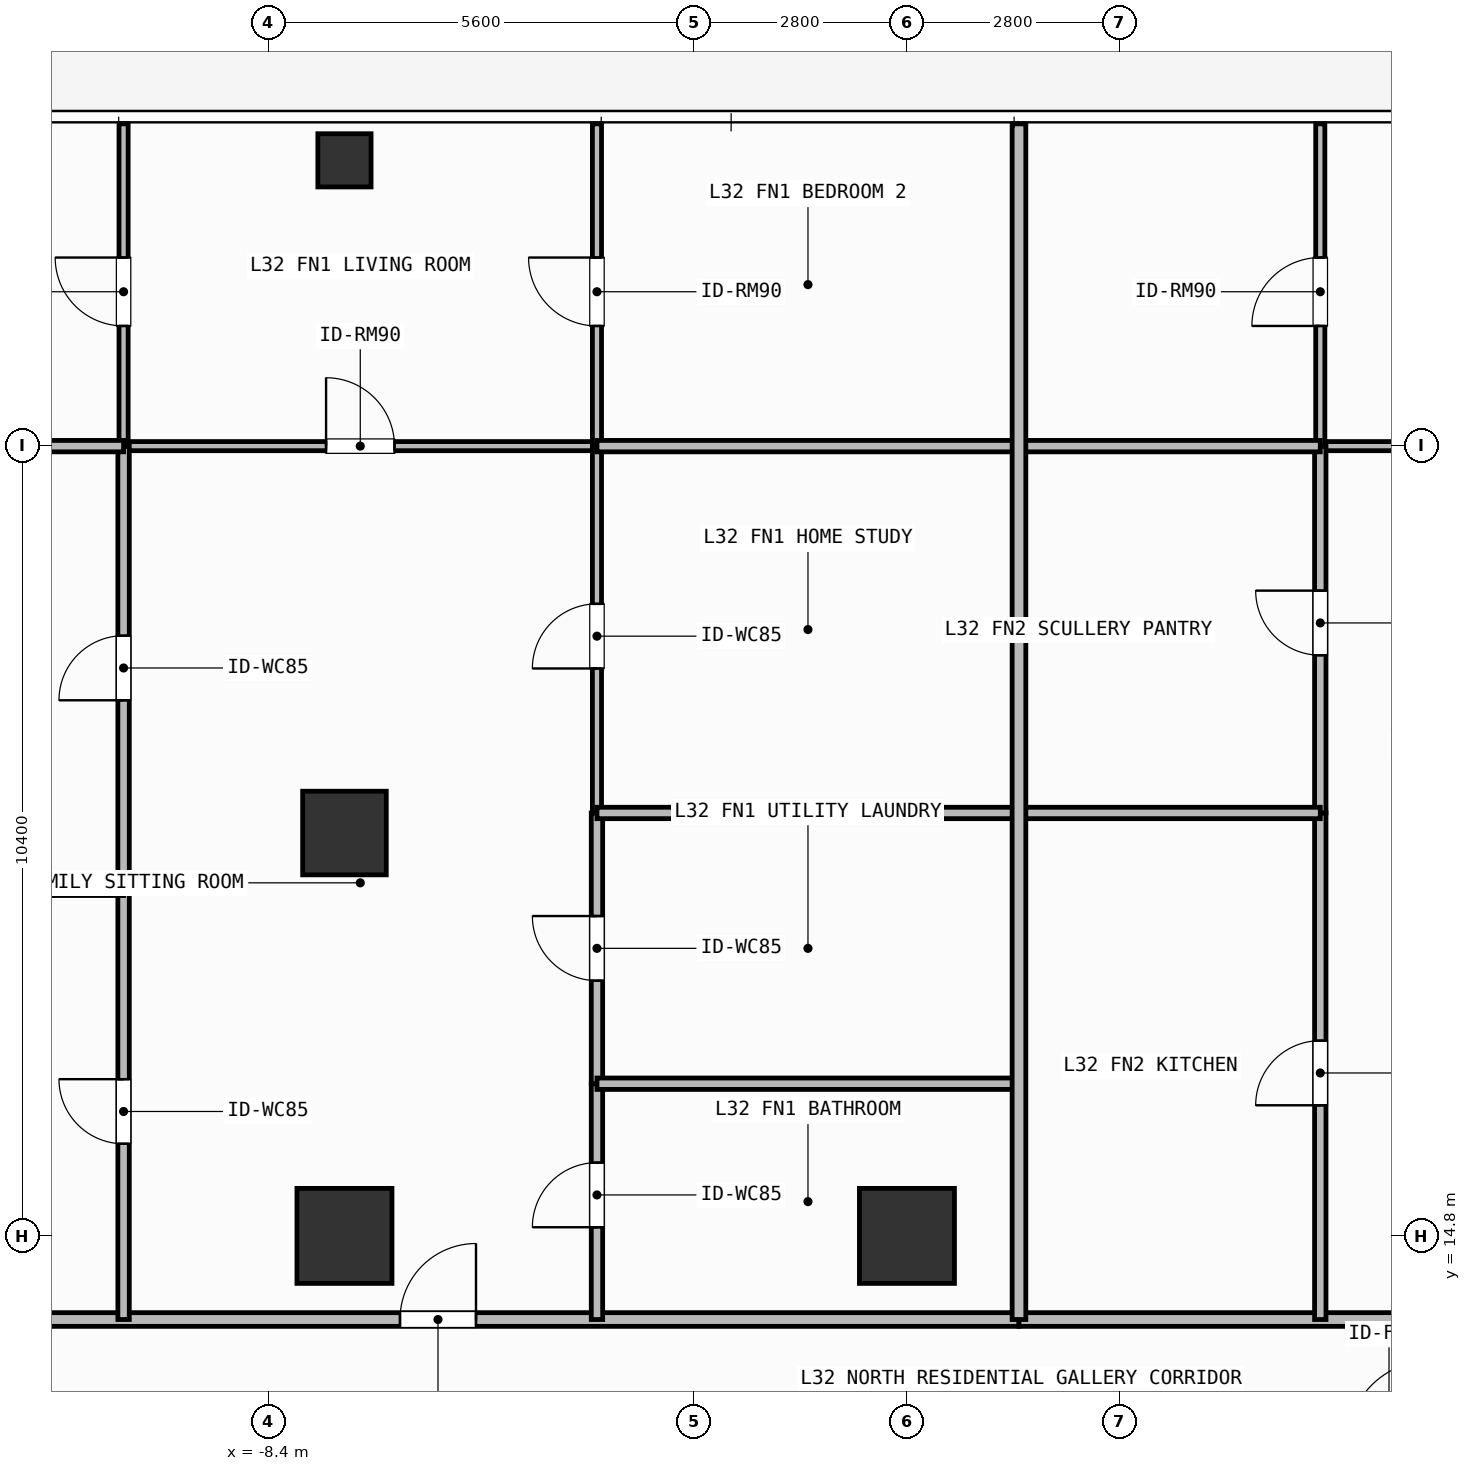
"""IFC4 building model, lengths in metres.
Left out: names, types, materials, properties, quantities, classifications, styles, units other than length and angle.
Written with IfcOpenShell. Run it as: python <this file> out.ifc"""

import sys

from ifc_helpers import new_model, si_unit, direction, frame, frame_2d, origin, origin_2d, place, context, subcontext, project, spatial, rectangle, hollow_rectangle, extrude, element, fill, save


model = new_model("IFC4")
c1 = context("Model", 3, precision=1e-05, world=origin(), true_north=direction((0.0, 1.0)))
c2 = subcontext(c1, "Body", "Model", "MODEL_VIEW")
j1 = project(units=[si_unit("LENGTHUNIT", "METRE"), si_unit("PLANEANGLEUNIT", "RADIAN")], contexts=[c1])
p1 = place(None, origin())
s1 = spatial("IfcSite", under=j1, at=p1, CompositionType="ELEMENT")
p2 = place(p1, origin())
s2 = spatial("IfcBuilding", under=s1, at=p2, CompositionType="ELEMENT")
p3 = place(p2, frame((0.0, 0.0, 129.0)))
s3 = spatial("IfcBuildingStorey", under=s2, at=p3, CompositionType="ELEMENT", Elevation=129.0)
for number, where, z_axis, x_axis in (
    (1, (-7.4, 14.8, 0.0), (0.0, 0.0, 1.0), (1.0, 0.0, 0.0)),
    (2, (0.0, 14.8, 0.0), (0.0, 0.0, 1.0), (1.0, 0.0, 0.0)),
):
    element("IfcColumn", number, at=place(p3, frame(where, z_axis=z_axis, x_axis=x_axis)), inside=s3, PredefinedType="COLUMN", context=c2, shape_type="SweptSolid", body=[
        extrude(rectangle(XDim=1.25, YDim=1.25, at=origin_2d()), origin(), (0.0, 0.0, 1.0), 3.9),
    ])
p4 = place(p3, frame((-7.4, 20.1, 0.0), z_axis=(0.0, 0.0, 1.0), x_axis=(1.0, 0.0, 0.0)))
e3 = element("IfcColumn", 3, at=p4, inside=s3, PredefinedType="COLUMN", context=c2, shape_type="SweptSolid", body=[
    extrude(rectangle(XDim=1.1, YDim=1.1, at=origin_2d()), origin(), (0.0, 0.0, 1.0), 3.9),
])
p5 = place(p3, frame((-7.4, 28.95, 0.0), z_axis=(0.0, 0.0, 1.0), x_axis=(1.0, 0.0, 0.0)))
e4 = element("IfcColumn", 4, at=p5, inside=s3, PredefinedType="COLUMN", context=c2, shape_type="SweptSolid", body=[
    extrude(hollow_rectangle(XDim=0.7, YDim=0.7, WallThickness=0.032, at=origin_2d()), origin(), (0.0, 0.0, 1.0), 3.9),
])
p6 = place(p3, frame((-16.32, 13.7, 0.0), z_axis=(0.0, 0.0, 1.0), x_axis=(1.0, 0.0, 0.0)))
e5 = element("IfcWall", 5, at=p6, inside=s3, PredefinedType="PARTITIONING", context=c2, shape_type="SweptSolid", body=[
    extrude(rectangle(XDim=17.794, YDim=0.18, at=frame_2d((8.897, 0.0))), origin(), (0.0, 0.0, 1.0), 3.68),
])
p7 = place(p6, frame((9.65, 0.0, 0.0)))
e6 = element("IfcOpeningElement", 6, at=p7, cuts=e5, PredefinedType="OPENING", context=c2, shape_type="SweptSolid", body=[
    extrude(rectangle(XDim=1.0, YDim=2.2, at=frame_2d((0.5, 1.1))), frame((0.0, 0.1, 0.0), z_axis=(0.0, -1.0, 0.0), x_axis=(1.0, 0.0, 0.0)), (0.0, 0.0, 1.0), 0.2),
])
p8 = place(p3, frame((-10.306, 25.19, 0.0), z_axis=(0.0, 0.0, 1.0), x_axis=(1.0, 0.0, 0.0)))
e7 = element("IfcWall", 7, at=p8, inside=s3, PredefinedType="PARTITIONING", context=c2, shape_type="SweptSolid", body=[
    extrude(rectangle(XDim=6.228, YDim=0.12, at=frame_2d((3.114, 0.0))), origin(), (0.0, 0.0, 1.0), 3.68),
])
p9 = place(p8, frame((2.664, 0.0, 0.0)))
e8 = element("IfcOpeningElement", 8, at=p9, cuts=e7, PredefinedType="OPENING", context=c2, shape_type="SweptSolid", body=[
    extrude(rectangle(XDim=0.9, YDim=2.1, at=frame_2d((0.45, 1.05))), frame((0.0, 0.07, 0.0), z_axis=(0.0, -1.0, 0.0), x_axis=(1.0, 0.0, 0.0)), (0.0, 0.0, 1.0), 0.14),
])
p10 = place(p3, frame((-10.306, 13.7, 0.0), z_axis=(0.0, 0.0, 1.0), x_axis=(0.0, 1.0, 0.0)))
e9 = element("IfcWall", 9, at=p10, inside=s3, PredefinedType="PARTITIONING", context=c2, shape_type="SweptSolid", body=[
    extrude(rectangle(XDim=5.653, YDim=0.15, at=frame_2d((2.827, 0.0))), origin(), (0.0, 0.0, 1.0), 3.68),
])
p11 = place(p10, frame((2.312, 0.0, 0.0)))
e10 = element("IfcOpeningElement", 10, at=p11, cuts=e9, PredefinedType="OPENING", context=c2, shape_type="SweptSolid", body=[
    extrude(rectangle(XDim=0.85, YDim=2.1, at=frame_2d((0.425, 1.05))), frame((0.0, 0.085, 0.0), z_axis=(0.0, -1.0, 0.0), x_axis=(1.0, 0.0, 0.0)), (0.0, 0.0, 1.0), 0.17),
])
p12 = place(p3, frame((-10.306, 19.353, 0.0), z_axis=(0.0, 0.0, 1.0), x_axis=(0.0, 1.0, 0.0)))
e11 = element("IfcWall", 11, at=p12, inside=s3, PredefinedType="PARTITIONING", context=c2, shape_type="SweptSolid", body=[
    extrude(rectangle(XDim=5.837, YDim=0.15, at=frame_2d((2.918, 0.0))), origin(), (0.0, 0.0, 1.0), 3.68),
])
p13 = place(p12, frame((2.493, 0.0, 0.0)))
e12 = element("IfcOpeningElement", 12, at=p13, cuts=e11, PredefinedType="OPENING", context=c2, shape_type="SweptSolid", body=[
    extrude(rectangle(XDim=0.85, YDim=2.1, at=frame_2d((0.425, 1.05))), frame((0.0, 0.085, 0.0), z_axis=(0.0, -1.0, 0.0), x_axis=(1.0, 0.0, 0.0)), (0.0, 0.0, 1.0), 0.17),
])
p14 = place(p3, frame((-10.306, 25.19, 0.0), z_axis=(0.0, 0.0, 1.0), x_axis=(0.0, 1.0, 0.0)))
e13 = element("IfcWall", 13, at=p14, inside=s3, PredefinedType="PARTITIONING", context=c2, shape_type="SweptSolid", body=[
    extrude(rectangle(XDim=4.24, YDim=0.12, at=frame_2d((2.12, 0.0))), origin(), (0.0, 0.0, 1.0), 3.68),
])
p15 = place(p14, frame((1.581, 0.0, 0.0)))
e14 = element("IfcOpeningElement", 14, at=p15, cuts=e13, PredefinedType="OPENING", context=c2, shape_type="SweptSolid", body=[
    extrude(rectangle(XDim=0.9, YDim=2.1, at=frame_2d((0.45, 1.05))), frame((0.0, 0.07, 0.0), z_axis=(0.0, -1.0, 0.0), x_axis=(1.0, 0.0, 0.0)), (0.0, 0.0, 1.0), 0.14),
])
p16 = place(p3, frame((-4.078, 13.7, 0.0), z_axis=(0.0, 0.0, 1.0), x_axis=(0.0, 1.0, 0.0)))
e15 = element("IfcWall", 15, at=p16, inside=s3, PredefinedType="PARTITIONING", context=c2, shape_type="SweptSolid", body=[
    extrude(rectangle(XDim=3.102, YDim=0.15, at=frame_2d((1.551, 0.0))), origin(), (0.0, 0.0, 1.0), 3.68),
])
p17 = place(p16, frame((1.214, 0.0, 0.0)))
e16 = element("IfcOpeningElement", 16, at=p17, cuts=e15, PredefinedType="OPENING", context=c2, shape_type="SweptSolid", body=[
    extrude(rectangle(XDim=0.85, YDim=2.1, at=frame_2d((0.425, 1.05))), frame((0.0, 0.085, 0.0), z_axis=(0.0, -1.0, 0.0), x_axis=(1.0, 0.0, 0.0)), (0.0, 0.0, 1.0), 0.17),
])
p18 = place(p3, frame((-4.078, 16.802, 0.0), z_axis=(0.0, 0.0, 1.0), x_axis=(0.0, 1.0, 0.0)))
e17 = element("IfcWall", 17, at=p18, inside=s3, PredefinedType="PARTITIONING", context=c2, shape_type="SweptSolid", body=[
    extrude(rectangle(XDim=3.562, YDim=0.15, at=frame_2d((1.781, 0.0))), origin(), (0.0, 0.0, 1.0), 3.68),
])
p19 = place(p18, frame((1.356, 0.0, 0.0)))
e18 = element("IfcOpeningElement", 18, at=p19, cuts=e17, PredefinedType="OPENING", context=c2, shape_type="SweptSolid", body=[
    extrude(rectangle(XDim=0.85, YDim=2.1, at=frame_2d((0.425, 1.05))), frame((0.0, 0.085, 0.0), z_axis=(0.0, -1.0, 0.0), x_axis=(1.0, 0.0, 0.0)), (0.0, 0.0, 1.0), 0.17),
])
p20 = place(p3, frame((-4.078, 20.364, 0.0), z_axis=(0.0, 0.0, 1.0), x_axis=(0.0, 1.0, 0.0)))
e19 = element("IfcWall", 19, at=p20, inside=s3, PredefinedType="PARTITIONING", context=c2, shape_type="SweptSolid", body=[
    extrude(rectangle(XDim=4.826, YDim=0.12, at=frame_2d((2.413, 0.0))), origin(), (0.0, 0.0, 1.0), 3.68),
])
p21 = place(p20, frame((1.901, 0.0, 0.0)))
e20 = element("IfcOpeningElement", 20, at=p21, cuts=e19, PredefinedType="OPENING", context=c2, shape_type="SweptSolid", body=[
    extrude(rectangle(XDim=0.85, YDim=2.1, at=frame_2d((0.425, 1.05))), frame((0.0, 0.07, 0.0), z_axis=(0.0, -1.0, 0.0), x_axis=(1.0, 0.0, 0.0)), (0.0, 0.0, 1.0), 0.14),
])
p22 = place(p3, frame((-4.078, 25.19, 0.0), z_axis=(0.0, 0.0, 1.0), x_axis=(0.0, 1.0, 0.0)))
e21 = element("IfcWall", 21, at=p22, inside=s3, PredefinedType="PARTITIONING", context=c2, shape_type="SweptSolid", body=[
    extrude(rectangle(XDim=4.24, YDim=0.12, at=frame_2d((2.12, 0.0))), origin(), (0.0, 0.0, 1.0), 3.68),
])
p23 = place(p22, frame((1.581, 0.0, 0.0)))
e22 = element("IfcOpeningElement", 22, at=p23, cuts=e21, PredefinedType="OPENING", context=c2, shape_type="SweptSolid", body=[
    extrude(rectangle(XDim=0.9, YDim=2.1, at=frame_2d((0.45, 1.05))), frame((0.0, 0.07, 0.0), z_axis=(0.0, -1.0, 0.0), x_axis=(1.0, 0.0, 0.0)), (0.0, 0.0, 1.0), 0.14),
])
p24 = place(p3, frame((1.474, 13.7, 0.0), z_axis=(0.0, 0.0, 1.0), x_axis=(1.0, 0.0, 0.0)))
e23 = element("IfcWall", 23, at=p24, inside=s3, PredefinedType="PARTITIONING", context=c2, shape_type="SweptSolid", body=[
    extrude(rectangle(XDim=22.646, YDim=0.18, at=frame_2d((11.323, 0.0))), origin(), (0.0, 0.0, 1.0), 3.68),
])
p25 = place(p24, frame((10.196, 0.0, 0.0)))
e24 = element("IfcOpeningElement", 24, at=p25, cuts=e23, PredefinedType="OPENING", context=c2, shape_type="SweptSolid", body=[
    extrude(rectangle(XDim=1.0, YDim=2.2, at=frame_2d((0.5, 1.1))), frame((0.0, 0.1, 0.0), z_axis=(0.0, -1.0, 0.0), x_axis=(1.0, 0.0, 0.0)), (0.0, 0.0, 1.0), 0.2),
])
p26 = place(p3, frame((5.438, 25.19, 0.0), z_axis=(0.0, 0.0, 1.0), x_axis=(1.0, 0.0, 0.0)))
e25 = element("IfcWall", 25, at=p26, inside=s3, PredefinedType="PARTITIONING", context=c2, shape_type="SweptSolid", body=[
    extrude(rectangle(XDim=6.006, YDim=0.12, at=frame_2d((3.003, 0.0))), origin(), (0.0, 0.0, 1.0), 3.68),
])
p27 = place(p26, frame((2.642, 0.0, 0.0)))
e26 = element("IfcOpeningElement", 26, at=p27, cuts=e25, PredefinedType="OPENING", context=c2, shape_type="SweptSolid", body=[
    extrude(rectangle(XDim=0.9, YDim=2.1, at=frame_2d((0.45, 1.05))), frame((0.0, 0.07, 0.0), z_axis=(0.0, -1.0, 0.0), x_axis=(1.0, 0.0, 0.0)), (0.0, 0.0, 1.0), 0.14),
])
p28 = place(p3, frame((5.438, 13.7, 0.0), z_axis=(0.0, 0.0, 1.0), x_axis=(0.0, 1.0, 0.0)))
e27 = element("IfcWall", 27, at=p28, inside=s3, PredefinedType="PARTITIONING", context=c2, shape_type="SweptSolid", body=[
    extrude(rectangle(XDim=6.664, YDim=0.15, at=frame_2d((3.332, 0.0))), origin(), (0.0, 0.0, 1.0), 3.68),
])
p29 = place(p28, frame((2.818, 0.0, 0.0)))
e28 = element("IfcOpeningElement", 28, at=p29, cuts=e27, PredefinedType="OPENING", context=c2, shape_type="SweptSolid", body=[
    extrude(rectangle(XDim=0.85, YDim=2.1, at=frame_2d((0.425, 1.05))), frame((0.0, 0.085, 0.0), z_axis=(0.0, -1.0, 0.0), x_axis=(1.0, 0.0, 0.0)), (0.0, 0.0, 1.0), 0.17),
])
p30 = place(p3, frame((5.438, 20.364, 0.0), z_axis=(0.0, 0.0, 1.0), x_axis=(0.0, 1.0, 0.0)))
e29 = element("IfcWall", 29, at=p30, inside=s3, PredefinedType="PARTITIONING", context=c2, shape_type="SweptSolid", body=[
    extrude(rectangle(XDim=4.826, YDim=0.15, at=frame_2d((2.413, 0.0))), origin(), (0.0, 0.0, 1.0), 3.68),
])
p31 = place(p30, frame((2.075, 0.0, 0.0)))
e30 = element("IfcOpeningElement", 30, at=p31, cuts=e29, PredefinedType="OPENING", context=c2, shape_type="SweptSolid", body=[
    extrude(rectangle(XDim=0.85, YDim=2.1, at=frame_2d((0.425, 1.05))), frame((0.0, 0.085, 0.0), z_axis=(0.0, -1.0, 0.0), x_axis=(1.0, 0.0, 0.0)), (0.0, 0.0, 1.0), 0.17),
])
p32 = place(p3, frame((5.438, 25.19, 0.0), z_axis=(0.0, 0.0, 1.0), x_axis=(0.0, 1.0, 0.0)))
e31 = element("IfcWall", 31, at=p32, inside=s3, PredefinedType="PARTITIONING", context=c2, shape_type="SweptSolid", body=[
    extrude(rectangle(XDim=4.24, YDim=0.12, at=frame_2d((2.12, 0.0))), origin(), (0.0, 0.0, 1.0), 3.68),
])
p33 = place(p32, frame((1.581, 0.0, 0.0)))
e32 = element("IfcOpeningElement", 32, at=p33, cuts=e31, PredefinedType="OPENING", context=c2, shape_type="SweptSolid", body=[
    extrude(rectangle(XDim=0.9, YDim=2.1, at=frame_2d((0.45, 1.05))), frame((0.0, 0.07, 0.0), z_axis=(0.0, -1.0, 0.0), x_axis=(1.0, 0.0, 0.0)), (0.0, 0.0, 1.0), 0.14),
])
for number, where, z_axis, x_axis in (
    (33, (-16.32, 19.353, 0.0), (0.0, 0.0, 1.0), (1.0, 0.0, 0.0)),
    (34, (-16.32, 25.19, 0.0), (0.0, 0.0, 1.0), (1.0, 0.0, 0.0)),
):
    element("IfcWall", number, at=place(p3, frame(where, z_axis=z_axis, x_axis=x_axis)), inside=s3, PredefinedType="PARTITIONING", context=c2, shape_type="SweptSolid", body=[
        extrude(rectangle(XDim=6.014, YDim=0.15, at=frame_2d((3.007, 0.0))), origin(), (0.0, 0.0, 1.0), 3.68),
    ])
p34 = place(p3, frame((-4.078, 16.802, 0.0), z_axis=(0.0, 0.0, 1.0), x_axis=(1.0, 0.0, 0.0)))
e35 = element("IfcWall", 35, at=p34, inside=s3, PredefinedType="PARTITIONING", context=c2, shape_type="SweptSolid", body=[
    extrude(rectangle(XDim=5.552, YDim=0.15, at=frame_2d((2.776, 0.0))), origin(), (0.0, 0.0, 1.0), 3.68),
])
p35 = place(p3, frame((-4.078, 20.364, 0.0), z_axis=(0.0, 0.0, 1.0), x_axis=(1.0, 0.0, 0.0)))
e36 = element("IfcWall", 36, at=p35, inside=s3, PredefinedType="PARTITIONING", context=c2, shape_type="SweptSolid", body=[
    extrude(rectangle(XDim=5.552, YDim=0.15, at=frame_2d((2.776, 0.0))), origin(), (0.0, 0.0, 1.0), 3.082),
])
p36 = place(p3, frame((-4.078, 25.19, 0.0), z_axis=(0.0, 0.0, 1.0), x_axis=(1.0, 0.0, 0.0)))
e37 = element("IfcWall", 37, at=p36, inside=s3, PredefinedType="PARTITIONING", context=c2, shape_type="SweptSolid", body=[
    extrude(rectangle(XDim=5.552, YDim=0.15, at=frame_2d((2.776, 0.0))), origin(), (0.0, 0.0, 1.0), 3.68),
])
p37 = place(p3, frame((1.474, 20.364, 0.0), z_axis=(0.0, 0.0, 1.0), x_axis=(1.0, 0.0, 0.0)))
e38 = element("IfcWall", 38, at=p37, inside=s3, PredefinedType="PARTITIONING", context=c2, shape_type="SweptSolid", body=[
    extrude(rectangle(XDim=3.964, YDim=0.15, at=frame_2d((1.982, 0.0))), origin(), (0.0, 0.0, 1.0), 3.082),
])
p38 = place(p3, frame((1.474, 25.19, 0.0), z_axis=(0.0, 0.0, 1.0), x_axis=(1.0, 0.0, 0.0)))
e39 = element("IfcWall", 39, at=p38, inside=s3, PredefinedType="PARTITIONING", context=c2, shape_type="SweptSolid", body=[
    extrude(rectangle(XDim=3.964, YDim=0.15, at=frame_2d((1.982, 0.0))), origin(), (0.0, 0.0, 1.0), 3.68),
])
p39 = place(p3, frame((1.474, 13.7, 0.0), z_axis=(0.0, 0.0, 1.0), x_axis=(0.0, 1.0, 0.0)))
e40 = element("IfcWall", 40, at=p39, inside=s3, PredefinedType="PARTITIONING", context=c2, shape_type="SweptSolid", body=[
    extrude(rectangle(XDim=15.73, YDim=0.18, at=frame_2d((7.865, 0.0))), origin(), (0.0, 0.0, 1.0), 3.68),
])
p40 = place(p7, origin())
e41 = element("IfcDoor", 41, at=p40, inside=s3, OperationType="SINGLE_SWING_RIGHT", PredefinedType="DOOR", context=c2, shape_type="SweptSolid", body=[
    extrude(rectangle(XDim=1.0, YDim=2.2, at=frame_2d((0.5, 1.1))), frame((0.0, 0.025, 0.0), z_axis=(0.0, -1.0, 0.0), x_axis=(1.0, 0.0, 0.0)), (0.0, 0.0, 1.0), 0.05),
])
fill(e6, e41)
p41 = place(p9, origin())
e42 = element("IfcDoor", 42, at=p41, inside=s3, OperationType="SINGLE_SWING_LEFT", PredefinedType="DOOR", context=c2, shape_type="SweptSolid", body=[
    extrude(rectangle(XDim=0.9, YDim=2.1, at=frame_2d((0.45, 1.05))), frame((0.0, 0.025, 0.0), z_axis=(0.0, -1.0, 0.0), x_axis=(1.0, 0.0, 0.0)), (0.0, 0.0, 1.0), 0.05),
])
fill(e8, e42)
p42 = place(p11, origin())
e43 = element("IfcDoor", 43, at=p42, inside=s3, OperationType="SINGLE_SWING_RIGHT", PredefinedType="DOOR", context=c2, shape_type="SweptSolid", body=[
    extrude(rectangle(XDim=0.85, YDim=2.1, at=frame_2d((0.425, 1.05))), frame((0.0, 0.025, 0.0), z_axis=(0.0, -1.0, 0.0), x_axis=(1.0, 0.0, 0.0)), (0.0, 0.0, 1.0), 0.05),
])
fill(e10, e43)
p43 = place(p13, origin())
e44 = element("IfcDoor", 44, at=p43, inside=s3, OperationType="SINGLE_SWING_LEFT", PredefinedType="DOOR", context=c2, shape_type="SweptSolid", body=[
    extrude(rectangle(XDim=0.85, YDim=2.1, at=frame_2d((0.425, 1.05))), frame((0.0, 0.025, 0.0), z_axis=(0.0, -1.0, 0.0), x_axis=(1.0, 0.0, 0.0)), (0.0, 0.0, 1.0), 0.05),
])
fill(e12, e44)
p44 = place(p15, origin())
e45 = element("IfcDoor", 45, at=p44, inside=s3, OperationType="SINGLE_SWING_RIGHT", PredefinedType="DOOR", context=c2, shape_type="SweptSolid", body=[
    extrude(rectangle(XDim=0.9, YDim=2.1, at=frame_2d((0.45, 1.05))), frame((0.0, 0.025, 0.0), z_axis=(0.0, -1.0, 0.0), x_axis=(1.0, 0.0, 0.0)), (0.0, 0.0, 1.0), 0.05),
])
fill(e14, e45)
p45 = place(p17, origin())
e46 = element("IfcDoor", 46, at=p45, inside=s3, OperationType="SINGLE_SWING_LEFT", PredefinedType="DOOR", context=c2, shape_type="SweptSolid", body=[
    extrude(rectangle(XDim=0.85, YDim=2.1, at=frame_2d((0.425, 1.05))), frame((0.0, 0.025, 0.0), z_axis=(0.0, -1.0, 0.0), x_axis=(1.0, 0.0, 0.0)), (0.0, 0.0, 1.0), 0.05),
])
fill(e16, e46)
p46 = place(p19, origin())
e47 = element("IfcDoor", 47, at=p46, inside=s3, OperationType="SINGLE_SWING_RIGHT", PredefinedType="DOOR", context=c2, shape_type="SweptSolid", body=[
    extrude(rectangle(XDim=0.85, YDim=2.1, at=frame_2d((0.425, 1.05))), frame((0.0, 0.025, 0.0), z_axis=(0.0, -1.0, 0.0), x_axis=(1.0, 0.0, 0.0)), (0.0, 0.0, 1.0), 0.05),
])
fill(e18, e47)
p47 = place(p21, origin())
e48 = element("IfcDoor", 48, at=p47, inside=s3, OperationType="SINGLE_SWING_LEFT", PredefinedType="DOOR", context=c2, shape_type="SweptSolid", body=[
    extrude(rectangle(XDim=0.85, YDim=2.1, at=frame_2d((0.425, 1.05))), frame((0.0, 0.025, 0.0), z_axis=(0.0, -1.0, 0.0), x_axis=(1.0, 0.0, 0.0)), (0.0, 0.0, 1.0), 0.05),
])
fill(e20, e48)
p48 = place(p23, origin())
e49 = element("IfcDoor", 49, at=p48, inside=s3, OperationType="SINGLE_SWING_RIGHT", PredefinedType="DOOR", context=c2, shape_type="SweptSolid", body=[
    extrude(rectangle(XDim=0.9, YDim=2.1, at=frame_2d((0.45, 1.05))), frame((0.0, 0.025, 0.0), z_axis=(0.0, -1.0, 0.0), x_axis=(1.0, 0.0, 0.0)), (0.0, 0.0, 1.0), 0.05),
])
fill(e22, e49)
p49 = place(p29, origin())
e50 = element("IfcDoor", 50, at=p49, inside=s3, OperationType="SINGLE_SWING_LEFT", PredefinedType="DOOR", context=c2, shape_type="SweptSolid", body=[
    extrude(rectangle(XDim=0.85, YDim=2.1, at=frame_2d((0.425, 1.05))), frame((0.0, 0.025, 0.0), z_axis=(0.0, -1.0, 0.0), x_axis=(1.0, 0.0, 0.0)), (0.0, 0.0, 1.0), 0.05),
])
fill(e28, e50)
p50 = place(p31, origin())
e51 = element("IfcDoor", 51, at=p50, inside=s3, OperationType="SINGLE_SWING_RIGHT", PredefinedType="DOOR", context=c2, shape_type="SweptSolid", body=[
    extrude(rectangle(XDim=0.85, YDim=2.1, at=frame_2d((0.425, 1.05))), frame((0.0, 0.025, 0.0), z_axis=(0.0, -1.0, 0.0), x_axis=(1.0, 0.0, 0.0)), (0.0, 0.0, 1.0), 0.05),
])
fill(e30, e51)
p51 = place(p33, origin())
e52 = element("IfcDoor", 52, at=p51, inside=s3, OperationType="SINGLE_SWING_LEFT", PredefinedType="DOOR", context=c2, shape_type="SweptSolid", body=[
    extrude(rectangle(XDim=0.9, YDim=2.1, at=frame_2d((0.45, 1.05))), frame((0.0, 0.025, 0.0), z_axis=(0.0, -1.0, 0.0), x_axis=(1.0, 0.0, 0.0)), (0.0, 0.0, 1.0), 0.05),
])
fill(e32, e52)
save(model, sys.argv[1])
